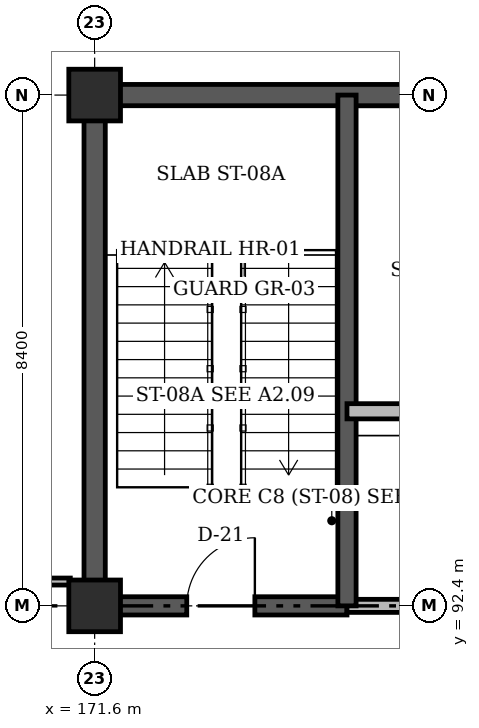
"""IFC4 building model, lengths in metres.
Left out: names, types, materials, properties, quantities, classifications, styles, units other than length and angle.
Written with IfcOpenShell. Run it as: python <this file> out.ifc"""

import sys

from ifc_helpers import new_model, si_unit, direction, frame, frame_2d, origin, origin_2d, place, context, subcontext, project, spatial, rectangle, extrude, element, fill, save


model = new_model("IFC4")
c1 = context("Model", 3, precision=1e-05, world=origin(), true_north=direction((0.0, 1.0)))
c2 = subcontext(c1, "Body", "Model", "MODEL_VIEW")
j1 = project(units=[si_unit("LENGTHUNIT", "METRE"), si_unit("PLANEANGLEUNIT", "RADIAN")], contexts=[c1])
p1 = place(None, origin())
s1 = spatial("IfcSite", under=j1, at=p1, CompositionType="ELEMENT")
p2 = place(p1, origin())
s2 = spatial("IfcBuilding", under=s1, at=p2, CompositionType="ELEMENT")
p3 = place(p2, frame((0.0, 0.0, -4.8)))
s3 = spatial("IfcBuildingStorey", under=s2, at=p3, CompositionType="ELEMENT", Elevation=-4.8)
p4 = place(p3, frame((171.425, 100.8, 0.0), z_axis=(0.0, 0.0, 1.0), x_axis=(1.0, 0.0, 0.0)))
e1 = element("IfcWall", 1, at=p4, inside=s3, PredefinedType="SHEAR", context=c2, shape_type="SweptSolid", body=[
    extrude(rectangle(XDim=8.15, YDim=0.35, at=frame_2d((4.075, 0.0))), origin(), (0.0, 0.0, 1.0), 4.4),
])
p5 = place(p3, frame((171.6, 92.4, 0.0), z_axis=(0.0, 0.0, 1.0), x_axis=(0.0, 1.0, 0.0)))
e2 = element("IfcWall", 2, at=p5, inside=s3, PredefinedType="SHEAR", context=c2, shape_type="SweptSolid", body=[
    extrude(rectangle(XDim=8.4, YDim=0.35, at=frame_2d((4.2, 0.0))), origin(), (0.0, 0.0, 1.0), 4.4),
])
for number, where, z_axis, x_axis in (
    (3, (171.6, 92.4, 0.0), (0.0, 0.0, 1.0), (1.0, 0.0, 0.0)),
    (4, (171.6, 100.8, 0.0), (0.0, 0.0, 1.0), (1.0, 0.0, 0.0)),
):
    element("IfcColumn", number, at=place(p3, frame(where, z_axis=z_axis, x_axis=x_axis)), inside=s3, PredefinedType="COLUMN", context=c2, shape_type="SweptSolid", body=[
        extrude(rectangle(XDim=0.85, YDim=0.85, at=origin_2d()), origin(), (0.0, 0.0, 1.0), 4.8),
    ])
p6 = place(p3, frame((171.6, 92.4, 0.0), z_axis=(0.0, 0.0, 1.0), x_axis=(1.0, 0.0, 0.0)))
e5 = element("IfcWall", 5, at=p6, inside=s3, PredefinedType="SHEAR", context=c2, shape_type="SweptSolid", body=[
    extrude(rectangle(XDim=4.15, YDim=0.3, at=frame_2d((2.075, 0.0))), origin(), (0.0, 0.0, 1.0), 4.8),
])
p7 = place(p6, frame((1.515, 0.0, 0.0)))
e6 = element("IfcOpeningElement", 6, at=p7, cuts=e5, PredefinedType="OPENING", context=c2, shape_type="SweptSolid", body=[
    extrude(rectangle(XDim=1.12, YDim=2.15, at=frame_2d((0.56, 1.075))), frame((0.0, 0.16, 0.0), z_axis=(0.0, -1.0, 0.0), x_axis=(1.0, 0.0, 0.0)), (0.0, 0.0, 1.0), 0.32),
])
p8 = place(p3, frame((175.75, 92.4, 0.0), z_axis=(0.0, 0.0, 1.0), x_axis=(1.0, 0.0, 0.0)))
e7 = element("IfcWall", 7, at=p8, inside=s3, PredefinedType="STANDARD", context=c2, shape_type="SweptSolid", body=[
    extrude(rectangle(XDim=3.29, YDim=0.215, at=frame_2d((1.645, 0.0))), origin(), (0.0, 0.0, 1.0), 3.53),
])
p9 = place(p8, frame((0.925, 0.0, 0.0)))
e8 = element("IfcOpeningElement", 8, at=p9, cuts=e7, PredefinedType="OPENING", context=c2, shape_type="SweptSolid", body=[
    extrude(rectangle(XDim=1.44, YDim=2.2, at=frame_2d((0.72, 1.1))), frame((0.0, 0.118, 0.0), z_axis=(0.0, -1.0, 0.0), x_axis=(1.0, 0.0, 0.0)), (0.0, 0.0, 1.0), 0.235),
])
p10 = place(p3, frame((175.75, 92.4, 0.0), z_axis=(0.0, 0.0, 1.0), x_axis=(0.0, 1.0, 0.0)))
e9 = element("IfcWall", 9, at=p10, inside=s3, PredefinedType="SHEAR", context=c2, shape_type="SweptSolid", body=[
    extrude(rectangle(XDim=8.4, YDim=0.3, at=frame_2d((4.2, 0.0))), origin(), (0.0, 0.0, 1.0), 4.8),
])
p11 = place(p3, frame((175.75, 95.6, 0.0), z_axis=(0.0, 0.0, 1.0), x_axis=(1.0, 0.0, 0.0)))
e10 = element("IfcWall", 10, at=p11, inside=s3, PredefinedType="STANDARD", context=c2, shape_type="SweptSolid", body=[
    extrude(rectangle(XDim=3.5, YDim=0.25, at=frame_2d((1.75, 0.0))), origin(), (0.0, 0.0, 1.0), 4.46),
])
p12 = place(p11, frame((1.2, 0.0, 0.0)))
e11 = element("IfcOpeningElement", 11, at=p12, cuts=e10, PredefinedType="OPENING", context=c2, shape_type="SweptSolid", body=[
    extrude(rectangle(XDim=1.1, YDim=2.2, at=frame_2d((0.55, 1.1))), frame((0.0, 0.135, 0.0), z_axis=(0.0, -1.0, 0.0), x_axis=(1.0, 0.0, 0.0)), (0.0, 0.0, 1.0), 0.27),
])
p13 = place(p3, frame((148.4, 92.8, 0.0), z_axis=(0.0, 0.0, 1.0), x_axis=(1.0, 0.0, 0.0)))
e12 = element("IfcWall", 12, at=p13, inside=s3, PredefinedType="PARTITIONING", context=c2, shape_type="SweptSolid", body=[
    extrude(rectangle(XDim=22.8, YDim=0.115, at=frame_2d((11.4, 0.0))), origin(), (0.0, 0.0, 1.0), 3.53),
])
p14 = place(p7, origin())
e13 = element("IfcDoor", 13, at=p14, inside=s3, OperationType="SINGLE_SWING_RIGHT", PredefinedType="DOOR", context=c2, shape_type="SweptSolid", body=[
    extrude(rectangle(XDim=1.12, YDim=2.15, at=frame_2d((0.56, 1.075))), frame((0.0, 0.025, 0.0), z_axis=(0.0, -1.0, 0.0), x_axis=(1.0, 0.0, 0.0)), (0.0, 0.0, 1.0), 0.05),
])
fill(e6, e13)
save(model, sys.argv[1])
